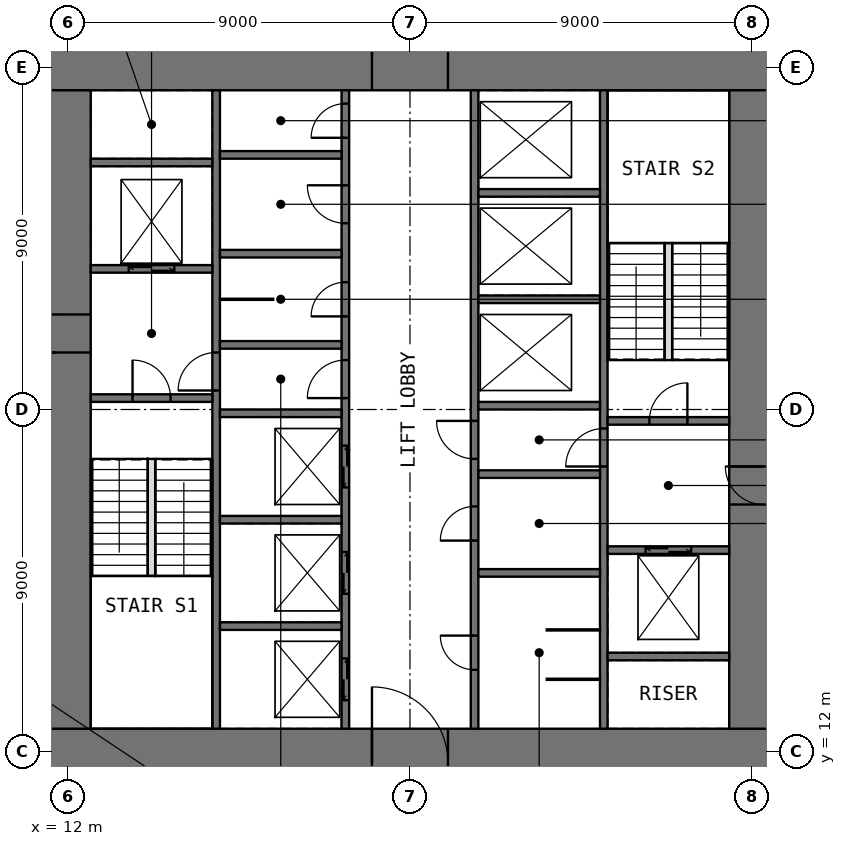
"""IFC4 building model, lengths in metres.
Left out: names, types, materials, properties, quantities, classifications, styles, units other than length and angle.
Written with IfcOpenShell. Run it as: python <this file> out.ifc"""

import sys

from ifc_helpers import new_model, si_unit, direction, frame, frame_2d, origin, place, context, subcontext, project, spatial, rectangle, extrude, element, fill, save


model = new_model("IFC4")
c1 = context("Model", 3, precision=1e-05, world=origin(), true_north=direction((0.0, 1.0)))
c2 = subcontext(c1, "Body", "Model", "MODEL_VIEW")
j1 = project(units=[si_unit("LENGTHUNIT", "METRE"), si_unit("PLANEANGLEUNIT", "RADIAN")], contexts=[c1])
p1 = place(None, origin())
s1 = spatial("IfcSite", under=j1, at=p1, CompositionType="ELEMENT")
p2 = place(p1, origin())
s2 = spatial("IfcBuilding", under=s1, at=p2, CompositionType="ELEMENT")
p3 = place(p2, frame((0.0, 0.0, 66.5)))
s3 = spatial("IfcBuildingStorey", under=s2, at=p3, CompositionType="ELEMENT", Elevation=66.5)
p4 = place(p3, frame((10.8, 11.7, -0.05), z_axis=(0.0, 0.0, 1.0), x_axis=(1.0, 0.0, 0.0)))
e1 = element("IfcWall", 1, at=p4, inside=s3, PredefinedType="SHEAR", context=c2, shape_type="SweptSolid", body=[
    extrude(rectangle(XDim=20.4, YDim=1.8, at=frame_2d((10.2, 0.0))), origin(), (0.0, 0.0, 1.0), 4.0),
])
p5 = place(p4, frame((9.2, 0.0, 0.05)))
e2 = element("IfcOpeningElement", 2, at=p5, cuts=e1, PredefinedType="OPENING", context=c2, shape_type="SweptSolid", body=[
    extrude(rectangle(XDim=2.0, YDim=2.2, at=frame_2d((1.0, 1.1))), frame((0.0, 0.91, 0.0), z_axis=(0.0, -1.0, 0.0), x_axis=(1.0, 0.0, 0.0)), (0.0, 0.0, 1.0), 1.82),
])
p6 = place(p3, frame((10.8, 30.3, -0.05), z_axis=(0.0, 0.0, 1.0), x_axis=(1.0, 0.0, 0.0)))
e3 = element("IfcWall", 3, at=p6, inside=s3, PredefinedType="SHEAR", context=c2, shape_type="SweptSolid", body=[
    extrude(rectangle(XDim=20.4, YDim=1.8, at=frame_2d((10.2, 0.0))), origin(), (0.0, 0.0, 1.0), 4.0),
])
p7 = place(p6, frame((9.2, 0.0, 0.05)))
e4 = element("IfcOpeningElement", 4, at=p7, cuts=e3, PredefinedType="OPENING", context=c2, shape_type="SweptSolid", body=[
    extrude(rectangle(XDim=2.0, YDim=2.2, at=frame_2d((1.0, 1.1))), frame((0.0, 0.91, 0.0), z_axis=(0.0, -1.0, 0.0), x_axis=(1.0, 0.0, 0.0)), (0.0, 0.0, 1.0), 1.82),
])
p8 = place(p3, frame((11.7, 12.6, -0.05), z_axis=(0.0, 0.0, 1.0), x_axis=(0.0, 1.0, 0.0)))
e5 = element("IfcWall", 5, at=p8, inside=s3, PredefinedType="SHEAR", context=c2, shape_type="SweptSolid", body=[
    extrude(rectangle(XDim=16.8, YDim=1.8, at=frame_2d((8.4, 0.0))), origin(), (0.0, 0.0, 1.0), 4.0),
])
p9 = place(p8, frame((9.9, 0.0, 0.05)))
e6 = element("IfcOpeningElement", 6, at=p9, cuts=e5, PredefinedType="OPENING", context=c2, shape_type="SweptSolid", body=[
    extrude(rectangle(XDim=1.0, YDim=2.2, at=frame_2d((0.5, 1.1))), frame((0.0, 0.91, 0.0), z_axis=(0.0, -1.0, 0.0), x_axis=(1.0, 0.0, 0.0)), (0.0, 0.0, 1.0), 1.82),
])
p10 = place(p3, frame((30.3, 12.6, -0.05), z_axis=(0.0, 0.0, 1.0), x_axis=(0.0, 1.0, 0.0)))
e7 = element("IfcWall", 7, at=p10, inside=s3, PredefinedType="SHEAR", context=c2, shape_type="SweptSolid", body=[
    extrude(rectangle(XDim=16.8, YDim=1.8, at=frame_2d((8.4, 0.0))), origin(), (0.0, 0.0, 1.0), 4.0),
])
p11 = place(p10, frame((5.9, 0.0, 0.05)))
e8 = element("IfcOpeningElement", 8, at=p11, cuts=e7, PredefinedType="OPENING", context=c2, shape_type="SweptSolid", body=[
    extrude(rectangle(XDim=1.0, YDim=2.2, at=frame_2d((0.5, 1.1))), frame((0.0, 0.91, 0.0), z_axis=(0.0, -1.0, 0.0), x_axis=(1.0, 0.0, 0.0)), (0.0, 0.0, 1.0), 1.82),
])
p12 = place(p3, frame((15.9, 12.6, -0.05), z_axis=(0.0, 0.0, 1.0), x_axis=(0.0, 1.0, 0.0)))
e9 = element("IfcWall", 9, at=p12, inside=s3, PredefinedType="SHEAR", context=c2, shape_type="SweptSolid", body=[
    extrude(rectangle(XDim=16.8, YDim=0.2, at=frame_2d((8.4, 0.0))), origin(), (0.0, 0.0, 1.0), 4.0),
])
p13 = place(p12, frame((8.9, 0.0, 0.05)))
e10 = element("IfcOpeningElement", 10, at=p13, cuts=e9, PredefinedType="OPENING", context=c2, shape_type="SweptSolid", body=[
    extrude(rectangle(XDim=1.0, YDim=2.2, at=frame_2d((0.5, 1.1))), frame((0.0, 0.11, 0.0), z_axis=(0.0, -1.0, 0.0), x_axis=(1.0, 0.0, 0.0)), (0.0, 0.0, 1.0), 0.22),
])
p14 = place(p3, frame((19.3, 12.6, -0.05), z_axis=(0.0, 0.0, 1.0), x_axis=(0.0, 1.0, 0.0)))
e11 = element("IfcWall", 11, at=p14, inside=s3, PredefinedType="SHEAR", context=c2, shape_type="SweptSolid", body=[
    extrude(rectangle(XDim=16.8, YDim=0.2, at=frame_2d((8.4, 0.0))), origin(), (0.0, 0.0, 1.0), 4.0),
])
p15 = place(p14, frame((8.7, 0.0, 0.05)))
e12 = element("IfcOpeningElement", 12, at=p15, cuts=e11, PredefinedType="OPENING", context=c2, shape_type="SweptSolid", body=[
    extrude(rectangle(XDim=1.0, YDim=2.2, at=frame_2d((0.5, 1.1))), frame((0.0, 0.11, 0.0), z_axis=(0.0, -1.0, 0.0), x_axis=(1.0, 0.0, 0.0)), (0.0, 0.0, 1.0), 0.22),
])
p16 = place(p14, frame((10.85, 0.0, 0.05)))
e13 = element("IfcOpeningElement", 13, at=p16, cuts=e11, PredefinedType="OPENING", context=c2, shape_type="SweptSolid", body=[
    extrude(rectangle(XDim=0.9, YDim=2.2, at=frame_2d((0.45, 1.1))), frame((0.0, 0.11, 0.0), z_axis=(0.0, -1.0, 0.0), x_axis=(1.0, 0.0, 0.0)), (0.0, 0.0, 1.0), 0.22),
])
p17 = place(p14, frame((13.3, 0.0, 0.05)))
e14 = element("IfcOpeningElement", 14, at=p17, cuts=e11, PredefinedType="OPENING", context=c2, shape_type="SweptSolid", body=[
    extrude(rectangle(XDim=1.0, YDim=2.2, at=frame_2d((0.5, 1.1))), frame((0.0, 0.11, 0.0), z_axis=(0.0, -1.0, 0.0), x_axis=(1.0, 0.0, 0.0)), (0.0, 0.0, 1.0), 0.22),
])
p18 = place(p14, frame((15.55, 0.0, 0.05)))
e15 = element("IfcOpeningElement", 15, at=p18, cuts=e11, PredefinedType="OPENING", context=c2, shape_type="SweptSolid", body=[
    extrude(rectangle(XDim=0.9, YDim=2.2, at=frame_2d((0.45, 1.1))), frame((0.0, 0.11, 0.0), z_axis=(0.0, -1.0, 0.0), x_axis=(1.0, 0.0, 0.0)), (0.0, 0.0, 1.0), 0.22),
])
p19 = place(p14, frame((0.75, 0.0, 0.05)))
e16 = element("IfcOpeningElement", 16, at=p19, cuts=e11, PredefinedType="OPENING", context=c2, shape_type="SweptSolid", body=[
    extrude(rectangle(XDim=1.1, YDim=2.2, at=frame_2d((0.55, 1.1))), frame((0.0, 0.11, 0.0), z_axis=(0.0, -1.0, 0.0), x_axis=(1.0, 0.0, 0.0)), (0.0, 0.0, 1.0), 0.22),
])
p20 = place(p14, frame((3.55, 0.0, 0.05)))
e17 = element("IfcOpeningElement", 17, at=p20, cuts=e11, PredefinedType="OPENING", context=c2, shape_type="SweptSolid", body=[
    extrude(rectangle(XDim=1.1, YDim=2.2, at=frame_2d((0.55, 1.1))), frame((0.0, 0.11, 0.0), z_axis=(0.0, -1.0, 0.0), x_axis=(1.0, 0.0, 0.0)), (0.0, 0.0, 1.0), 0.22),
])
p21 = place(p14, frame((6.35, 0.0, 0.05)))
e18 = element("IfcOpeningElement", 18, at=p21, cuts=e11, PredefinedType="OPENING", context=c2, shape_type="SweptSolid", body=[
    extrude(rectangle(XDim=1.1, YDim=2.2, at=frame_2d((0.55, 1.1))), frame((0.0, 0.11, 0.0), z_axis=(0.0, -1.0, 0.0), x_axis=(1.0, 0.0, 0.0)), (0.0, 0.0, 1.0), 0.22),
])
p22 = place(p3, frame((22.7, 12.6, -0.05), z_axis=(0.0, 0.0, 1.0), x_axis=(0.0, 1.0, 0.0)))
e19 = element("IfcWall", 19, at=p22, inside=s3, PredefinedType="SHEAR", context=c2, shape_type="SweptSolid", body=[
    extrude(rectangle(XDim=16.8, YDim=0.2, at=frame_2d((8.4, 0.0))), origin(), (0.0, 0.0, 1.0), 4.0),
])
p23 = place(p22, frame((7.1, 0.0, 0.05)))
e20 = element("IfcOpeningElement", 20, at=p23, cuts=e19, PredefinedType="OPENING", context=c2, shape_type="SweptSolid", body=[
    extrude(rectangle(XDim=1.0, YDim=2.2, at=frame_2d((0.5, 1.1))), frame((0.0, 0.11, 0.0), z_axis=(0.0, -1.0, 0.0), x_axis=(1.0, 0.0, 0.0)), (0.0, 0.0, 1.0), 0.22),
])
p24 = place(p22, frame((1.55, 0.0, 0.05)))
e21 = element("IfcOpeningElement", 21, at=p24, cuts=e19, PredefinedType="OPENING", context=c2, shape_type="SweptSolid", body=[
    extrude(rectangle(XDim=0.9, YDim=2.2, at=frame_2d((0.45, 1.1))), frame((0.0, 0.11, 0.0), z_axis=(0.0, -1.0, 0.0), x_axis=(1.0, 0.0, 0.0)), (0.0, 0.0, 1.0), 0.22),
])
p25 = place(p22, frame((4.95, 0.0, 0.05)))
e22 = element("IfcOpeningElement", 22, at=p25, cuts=e19, PredefinedType="OPENING", context=c2, shape_type="SweptSolid", body=[
    extrude(rectangle(XDim=0.9, YDim=2.2, at=frame_2d((0.45, 1.1))), frame((0.0, 0.11, 0.0), z_axis=(0.0, -1.0, 0.0), x_axis=(1.0, 0.0, 0.0)), (0.0, 0.0, 1.0), 0.22),
])
p26 = place(p3, frame((26.1, 12.6, -0.05), z_axis=(0.0, 0.0, 1.0), x_axis=(0.0, 1.0, 0.0)))
e23 = element("IfcWall", 23, at=p26, inside=s3, PredefinedType="SHEAR", context=c2, shape_type="SweptSolid", body=[
    extrude(rectangle(XDim=16.8, YDim=0.2, at=frame_2d((8.4, 0.0))), origin(), (0.0, 0.0, 1.0), 4.0),
])
p27 = place(p26, frame((6.9, 0.0, 0.05)))
e24 = element("IfcOpeningElement", 24, at=p27, cuts=e23, PredefinedType="OPENING", context=c2, shape_type="SweptSolid", body=[
    extrude(rectangle(XDim=1.0, YDim=2.2, at=frame_2d((0.5, 1.1))), frame((0.0, 0.11, 0.0), z_axis=(0.0, -1.0, 0.0), x_axis=(1.0, 0.0, 0.0)), (0.0, 0.0, 1.0), 0.22),
])
p28 = place(p3, frame((12.6, 21.3, -0.05), z_axis=(0.0, 0.0, 1.0), x_axis=(1.0, 0.0, 0.0)))
e25 = element("IfcWall", 25, at=p28, inside=s3, PredefinedType="SHEAR", context=c2, shape_type="SweptSolid", body=[
    extrude(rectangle(XDim=3.2, YDim=0.2, at=frame_2d((1.6, 0.0))), origin(), (0.0, 0.0, 1.0), 4.0),
])
p29 = place(p28, frame((1.1, 0.0, 0.05)))
e26 = element("IfcOpeningElement", 26, at=p29, cuts=e25, PredefinedType="OPENING", context=c2, shape_type="SweptSolid", body=[
    extrude(rectangle(XDim=1.0, YDim=2.2, at=frame_2d((0.5, 1.1))), frame((0.0, 0.11, 0.0), z_axis=(0.0, -1.0, 0.0), x_axis=(1.0, 0.0, 0.0)), (0.0, 0.0, 1.0), 0.22),
])
p30 = place(p3, frame((12.6, 24.7, -0.05), z_axis=(0.0, 0.0, 1.0), x_axis=(1.0, 0.0, 0.0)))
e27 = element("IfcWall", 27, at=p30, inside=s3, PredefinedType="SHEAR", context=c2, shape_type="SweptSolid", body=[
    extrude(rectangle(XDim=3.2, YDim=0.2, at=frame_2d((1.6, 0.0))), origin(), (0.0, 0.0, 1.0), 4.0),
])
p31 = place(p30, frame((1.0, 0.0, 0.05)))
e28 = element("IfcOpeningElement", 28, at=p31, cuts=e27, PredefinedType="OPENING", context=c2, shape_type="SweptSolid", body=[
    extrude(rectangle(XDim=1.2, YDim=2.2, at=frame_2d((0.6, 1.1))), frame((0.0, 0.11, 0.0), z_axis=(0.0, -1.0, 0.0), x_axis=(1.0, 0.0, 0.0)), (0.0, 0.0, 1.0), 0.22),
])
for number, where, z_axis, x_axis in (
    (29, (12.6, 27.5, -0.05), (0.0, 0.0, 1.0), (1.0, 0.0, 0.0)),
    (30, (16.0, 15.3, -0.05), (0.0, 0.0, 1.0), (1.0, 0.0, 0.0)),
    (31, (16.0, 18.1, -0.05), (0.0, 0.0, 1.0), (1.0, 0.0, 0.0)),
    (32, (16.0, 20.9, -0.05), (0.0, 0.0, 1.0), (1.0, 0.0, 0.0)),
    (33, (16.0, 22.7, -0.05), (0.0, 0.0, 1.0), (1.0, 0.0, 0.0)),
    (34, (16.0, 25.1, -0.05), (0.0, 0.0, 1.0), (1.0, 0.0, 0.0)),
    (35, (16.0, 27.7, -0.05), (0.0, 0.0, 1.0), (1.0, 0.0, 0.0)),
    (36, (22.8, 16.7, -0.05), (0.0, 0.0, 1.0), (1.0, 0.0, 0.0)),
    (37, (22.8, 19.3, -0.05), (0.0, 0.0, 1.0), (1.0, 0.0, 0.0)),
    (38, (22.8, 21.1, -0.05), (0.0, 0.0, 1.0), (1.0, 0.0, 0.0)),
    (39, (22.8, 23.9, -0.05), (0.0, 0.0, 1.0), (1.0, 0.0, 0.0)),
    (40, (22.8, 26.7, -0.05), (0.0, 0.0, 1.0), (1.0, 0.0, 0.0)),
    (41, (26.2, 14.5, -0.05), (0.0, 0.0, 1.0), (1.0, 0.0, 0.0)),
):
    element("IfcWall", number, at=place(p3, frame(where, z_axis=z_axis, x_axis=x_axis)), inside=s3, PredefinedType="SHEAR", context=c2, shape_type="SweptSolid", body=[
        extrude(rectangle(XDim=3.2, YDim=0.2, at=frame_2d((1.6, 0.0))), origin(), (0.0, 0.0, 1.0), 4.0),
    ])
p32 = place(p3, frame((26.2, 17.3, -0.05), z_axis=(0.0, 0.0, 1.0), x_axis=(1.0, 0.0, 0.0)))
e42 = element("IfcWall", 42, at=p32, inside=s3, PredefinedType="SHEAR", context=c2, shape_type="SweptSolid", body=[
    extrude(rectangle(XDim=3.2, YDim=0.2, at=frame_2d((1.6, 0.0))), origin(), (0.0, 0.0, 1.0), 4.0),
])
p33 = place(p32, frame((1.0, 0.0, 0.05)))
e43 = element("IfcOpeningElement", 43, at=p33, cuts=e42, PredefinedType="OPENING", context=c2, shape_type="SweptSolid", body=[
    extrude(rectangle(XDim=1.2, YDim=2.2, at=frame_2d((0.6, 1.1))), frame((0.0, 0.11, 0.0), z_axis=(0.0, -1.0, 0.0), x_axis=(1.0, 0.0, 0.0)), (0.0, 0.0, 1.0), 0.22),
])
p34 = place(p3, frame((26.2, 20.7, -0.05), z_axis=(0.0, 0.0, 1.0), x_axis=(1.0, 0.0, 0.0)))
e44 = element("IfcWall", 44, at=p34, inside=s3, PredefinedType="SHEAR", context=c2, shape_type="SweptSolid", body=[
    extrude(rectangle(XDim=3.2, YDim=0.2, at=frame_2d((1.6, 0.0))), origin(), (0.0, 0.0, 1.0), 4.0),
])
p35 = place(p34, frame((1.1, 0.0, 0.05)))
e45 = element("IfcOpeningElement", 45, at=p35, cuts=e44, PredefinedType="OPENING", context=c2, shape_type="SweptSolid", body=[
    extrude(rectangle(XDim=1.0, YDim=2.2, at=frame_2d((0.5, 1.1))), frame((0.0, 0.11, 0.0), z_axis=(0.0, -1.0, 0.0), x_axis=(1.0, 0.0, 0.0)), (0.0, 0.0, 1.0), 0.22),
])
for number, where, z_axis, x_axis in (
    (46, (24.6, 13.9, 0.0), (0.0, 0.0, 1.0), (1.0, 0.0, 0.0)),
    (47, (24.6, 15.2, 0.0), (0.0, 0.0, 1.0), (1.0, 0.0, 0.0)),
    (48, (16.0, 23.9, 0.0), (0.0, 0.0, 1.0), (1.0, 0.0, 0.0)),
):
    element("IfcWall", number, at=place(p3, frame(where, z_axis=z_axis, x_axis=x_axis)), inside=s3, PredefinedType="PARTITIONING", context=c2, shape_type="SweptSolid", body=[
        extrude(rectangle(XDim=1.4, YDim=0.03, at=frame_2d((0.7, 0.0))), origin(), (0.0, 0.0, 1.0), 3.75),
    ])
for number, where, z_axis, x_axis in (
    (49, (14.2, 16.62, 0.0), (0.0, 0.0, 1.0), (0.0, 1.0, 0.0)),
    (50, (27.8, 22.3, 0.0), (0.0, 0.0, 1.0), (0.0, 1.0, 0.0)),
):
    element("IfcWall", number, at=place(p3, frame(where, z_axis=z_axis, x_axis=x_axis)), inside=s3, PredefinedType="PARTITIONING", context=c2, shape_type="SweptSolid", body=[
        extrude(rectangle(XDim=3.08, YDim=0.2, at=frame_2d((1.54, 0.0))), origin(), (0.0, 0.0, 1.0), 4.0),
    ])
p36 = place(p5, origin())
e51 = element("IfcDoor", 51, at=p36, inside=s3, OperationType="DOUBLE_DOOR_SINGLE_SWING", PredefinedType="DOOR", context=c2, shape_type="SweptSolid", body=[
    extrude(rectangle(XDim=2.0, YDim=2.2, at=frame_2d((1.0, 1.1))), frame((0.0, 0.025, 0.0), z_axis=(0.0, -1.0, 0.0), x_axis=(1.0, 0.0, 0.0)), (0.0, 0.0, 1.0), 0.05),
])
fill(e2, e51)
p37 = place(p7, origin())
e52 = element("IfcDoor", 52, at=p37, inside=s3, OperationType="DOUBLE_DOOR_SINGLE_SWING", PredefinedType="DOOR", context=c2, shape_type="SweptSolid", body=[
    extrude(rectangle(XDim=2.0, YDim=2.2, at=frame_2d((1.0, 1.1))), frame((0.0, 0.025, 0.0), z_axis=(0.0, -1.0, 0.0), x_axis=(1.0, 0.0, 0.0)), (0.0, 0.0, 1.0), 0.05),
])
fill(e4, e52)
p38 = place(p9, origin())
e53 = element("IfcDoor", 53, at=p38, inside=s3, OperationType="SINGLE_SWING_LEFT", PredefinedType="DOOR", context=c2, shape_type="SweptSolid", body=[
    extrude(rectangle(XDim=1.0, YDim=2.2, at=frame_2d((0.5, 1.1))), frame((0.0, 0.025, 0.0), z_axis=(0.0, -1.0, 0.0), x_axis=(1.0, 0.0, 0.0)), (0.0, 0.0, 1.0), 0.05),
])
fill(e6, e53)
p39 = place(p11, origin())
e54 = element("IfcDoor", 54, at=p39, inside=s3, OperationType="SINGLE_SWING_RIGHT", PredefinedType="DOOR", context=c2, shape_type="SweptSolid", body=[
    extrude(rectangle(XDim=1.0, YDim=2.2, at=frame_2d((0.5, 1.1))), frame((0.0, 0.025, 0.0), z_axis=(0.0, -1.0, 0.0), x_axis=(1.0, 0.0, 0.0)), (0.0, 0.0, 1.0), 0.05),
])
fill(e8, e54)
p40 = place(p29, origin())
e55 = element("IfcDoor", 55, at=p40, inside=s3, OperationType="SINGLE_SWING_LEFT", PredefinedType="DOOR", context=c2, shape_type="SweptSolid", body=[
    extrude(rectangle(XDim=1.0, YDim=2.2, at=frame_2d((0.5, 1.1))), frame((0.0, 0.025, 0.0), z_axis=(0.0, -1.0, 0.0), x_axis=(1.0, 0.0, 0.0)), (0.0, 0.0, 1.0), 0.05),
])
fill(e26, e55)
p41 = place(p35, origin())
e56 = element("IfcDoor", 56, at=p41, inside=s3, OperationType="SINGLE_SWING_RIGHT", PredefinedType="DOOR", context=c2, shape_type="SweptSolid", body=[
    extrude(rectangle(XDim=1.0, YDim=2.2, at=frame_2d((0.5, 1.1))), frame((0.0, 0.025, 0.0), z_axis=(0.0, -1.0, 0.0), x_axis=(1.0, 0.0, 0.0)), (0.0, 0.0, 1.0), 0.05),
])
fill(e45, e56)
p42 = place(p13, origin())
e57 = element("IfcDoor", 57, at=p42, inside=s3, OperationType="SINGLE_SWING_LEFT", PredefinedType="DOOR", context=c2, shape_type="SweptSolid", body=[
    extrude(rectangle(XDim=1.0, YDim=2.2, at=frame_2d((0.5, 1.1))), frame((0.0, 0.025, 0.0), z_axis=(0.0, -1.0, 0.0), x_axis=(1.0, 0.0, 0.0)), (0.0, 0.0, 1.0), 0.05),
])
fill(e10, e57)
p43 = place(p27, origin())
e58 = element("IfcDoor", 58, at=p43, inside=s3, OperationType="SINGLE_SWING_LEFT", PredefinedType="DOOR", context=c2, shape_type="SweptSolid", body=[
    extrude(rectangle(XDim=1.0, YDim=2.2, at=frame_2d((0.5, 1.1))), frame((0.0, 0.025, 0.0), z_axis=(0.0, -1.0, 0.0), x_axis=(1.0, 0.0, 0.0)), (0.0, 0.0, 1.0), 0.05),
])
fill(e24, e58)
p44 = place(p15, origin())
e59 = element("IfcDoor", 59, at=p44, inside=s3, OperationType="SINGLE_SWING_LEFT", PredefinedType="DOOR", context=c2, shape_type="SweptSolid", body=[
    extrude(rectangle(XDim=1.0, YDim=2.2, at=frame_2d((0.5, 1.1))), frame((0.0, 0.025, 0.0), z_axis=(0.0, -1.0, 0.0), x_axis=(1.0, 0.0, 0.0)), (0.0, 0.0, 1.0), 0.05),
])
fill(e12, e59)
p45 = place(p23, origin())
e60 = element("IfcDoor", 60, at=p45, inside=s3, OperationType="SINGLE_SWING_RIGHT", PredefinedType="DOOR", context=c2, shape_type="SweptSolid", body=[
    extrude(rectangle(XDim=1.0, YDim=2.2, at=frame_2d((0.5, 1.1))), frame((0.0, 0.025, 0.0), z_axis=(0.0, -1.0, 0.0), x_axis=(1.0, 0.0, 0.0)), (0.0, 0.0, 1.0), 0.05),
])
fill(e20, e60)
p46 = place(p16, origin())
e61 = element("IfcDoor", 61, at=p46, inside=s3, OperationType="SINGLE_SWING_LEFT", PredefinedType="DOOR", context=c2, shape_type="SweptSolid", body=[
    extrude(rectangle(XDim=0.9, YDim=2.2, at=frame_2d((0.45, 1.1))), frame((0.0, 0.025, 0.0), z_axis=(0.0, -1.0, 0.0), x_axis=(1.0, 0.0, 0.0)), (0.0, 0.0, 1.0), 0.05),
])
fill(e13, e61)
p47 = place(p17, origin())
e62 = element("IfcDoor", 62, at=p47, inside=s3, OperationType="SINGLE_SWING_RIGHT", PredefinedType="DOOR", context=c2, shape_type="SweptSolid", body=[
    extrude(rectangle(XDim=1.0, YDim=2.2, at=frame_2d((0.5, 1.1))), frame((0.0, 0.025, 0.0), z_axis=(0.0, -1.0, 0.0), x_axis=(1.0, 0.0, 0.0)), (0.0, 0.0, 1.0), 0.05),
])
fill(e14, e62)
p48 = place(p18, origin())
e63 = element("IfcDoor", 63, at=p48, inside=s3, OperationType="SINGLE_SWING_LEFT", PredefinedType="DOOR", context=c2, shape_type="SweptSolid", body=[
    extrude(rectangle(XDim=0.9, YDim=2.2, at=frame_2d((0.45, 1.1))), frame((0.0, 0.025, 0.0), z_axis=(0.0, -1.0, 0.0), x_axis=(1.0, 0.0, 0.0)), (0.0, 0.0, 1.0), 0.05),
])
fill(e15, e63)
p49 = place(p24, origin())
e64 = element("IfcDoor", 64, at=p49, inside=s3, OperationType="SINGLE_SWING_RIGHT", PredefinedType="DOOR", context=c2, shape_type="SweptSolid", body=[
    extrude(rectangle(XDim=0.9, YDim=2.2, at=frame_2d((0.45, 1.1))), frame((0.0, 0.025, 0.0), z_axis=(0.0, -1.0, 0.0), x_axis=(1.0, 0.0, 0.0)), (0.0, 0.0, 1.0), 0.05),
])
fill(e21, e64)
p50 = place(p25, origin())
e65 = element("IfcDoor", 65, at=p50, inside=s3, OperationType="SINGLE_SWING_LEFT", PredefinedType="DOOR", context=c2, shape_type="SweptSolid", body=[
    extrude(rectangle(XDim=0.9, YDim=2.2, at=frame_2d((0.45, 1.1))), frame((0.0, 0.025, 0.0), z_axis=(0.0, -1.0, 0.0), x_axis=(1.0, 0.0, 0.0)), (0.0, 0.0, 1.0), 0.05),
])
fill(e22, e65)
p51 = place(p19, origin())
e66 = element("IfcDoor", 66, at=p51, inside=s3, OperationType="DOUBLE_DOOR_SLIDING", PredefinedType="DOOR", context=c2, shape_type="SweptSolid", body=[
    extrude(rectangle(XDim=1.1, YDim=2.2, at=frame_2d((0.55, 1.1))), frame((0.0, 0.025, 0.0), z_axis=(0.0, -1.0, 0.0), x_axis=(1.0, 0.0, 0.0)), (0.0, 0.0, 1.0), 0.05),
])
fill(e16, e66)
p52 = place(p20, origin())
e67 = element("IfcDoor", 67, at=p52, inside=s3, OperationType="DOUBLE_DOOR_SLIDING", PredefinedType="DOOR", context=c2, shape_type="SweptSolid", body=[
    extrude(rectangle(XDim=1.1, YDim=2.2, at=frame_2d((0.55, 1.1))), frame((0.0, 0.025, 0.0), z_axis=(0.0, -1.0, 0.0), x_axis=(1.0, 0.0, 0.0)), (0.0, 0.0, 1.0), 0.05),
])
fill(e17, e67)
p53 = place(p21, origin())
e68 = element("IfcDoor", 68, at=p53, inside=s3, OperationType="DOUBLE_DOOR_SLIDING", PredefinedType="DOOR", context=c2, shape_type="SweptSolid", body=[
    extrude(rectangle(XDim=1.1, YDim=2.2, at=frame_2d((0.55, 1.1))), frame((0.0, 0.025, 0.0), z_axis=(0.0, -1.0, 0.0), x_axis=(1.0, 0.0, 0.0)), (0.0, 0.0, 1.0), 0.05),
])
fill(e18, e68)
p54 = place(p31, origin())
e69 = element("IfcDoor", 69, at=p54, inside=s3, OperationType="DOUBLE_DOOR_SLIDING", PredefinedType="DOOR", context=c2, shape_type="SweptSolid", body=[
    extrude(rectangle(XDim=1.2, YDim=2.2, at=frame_2d((0.6, 1.1))), frame((0.0, 0.025, 0.0), z_axis=(0.0, -1.0, 0.0), x_axis=(1.0, 0.0, 0.0)), (0.0, 0.0, 1.0), 0.05),
])
fill(e28, e69)
p55 = place(p33, origin())
e70 = element("IfcDoor", 70, at=p55, inside=s3, OperationType="DOUBLE_DOOR_SLIDING", PredefinedType="DOOR", context=c2, shape_type="SweptSolid", body=[
    extrude(rectangle(XDim=1.2, YDim=2.2, at=frame_2d((0.6, 1.1))), frame((0.0, 0.025, 0.0), z_axis=(0.0, -1.0, 0.0), x_axis=(1.0, 0.0, 0.0)), (0.0, 0.0, 1.0), 0.05),
])
fill(e43, e70)
save(model, sys.argv[1])
